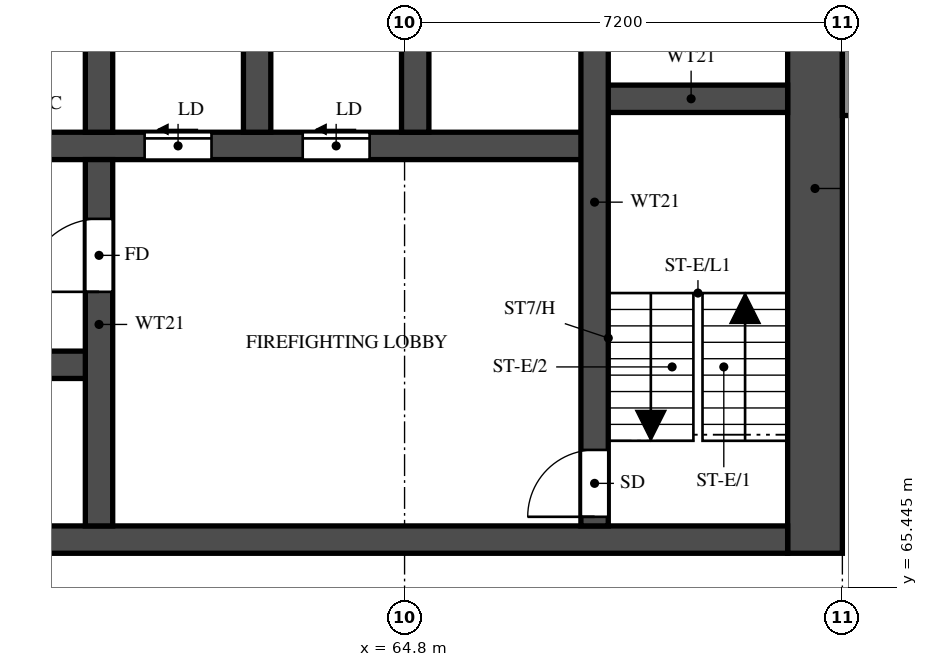
"""IFC4 building model, lengths in metres.
Left out: names, types, materials, properties, quantities, classifications, styles, units other than length and angle.
Written with IfcOpenShell. Run it as: python <this file> out.ifc"""

import sys

from ifc_helpers import new_model, si_unit, direction, frame, frame_2d, origin, place, context, subcontext, project, spatial, rectangle, extrude, element, fill, save


model = new_model("IFC4")
c1 = context("Model", 3, precision=1e-05, world=origin(), true_north=direction((0.0, 1.0)))
c2 = subcontext(c1, "Body", "Model", "MODEL_VIEW")
j1 = project(units=[si_unit("LENGTHUNIT", "METRE"), si_unit("PLANEANGLEUNIT", "RADIAN")], contexts=[c1])
p1 = place(None, origin())
s1 = spatial("IfcSite", under=j1, at=p1, CompositionType="ELEMENT")
p2 = place(p1, origin())
s2 = spatial("IfcBuilding", under=s1, at=p2, CompositionType="ELEMENT")
p3 = place(p2, frame((0.0, 0.0, 41.0)))
s3 = spatial("IfcBuildingStorey", under=s2, at=p3, CompositionType="ELEMENT", Elevation=41.0)
p4 = place(p3, frame((71.55, 66.0, 0.0), z_axis=(0.0, 0.0, 1.0), x_axis=(0.0, 1.0, 0.0)))
e1 = element("IfcWall", 1, at=p4, inside=s3, PredefinedType="SHEAR", context=c2, shape_type="SweptSolid", body=[
    extrude(rectangle(XDim=12.0, YDim=0.9, at=frame_2d((6.0, 0.0))), origin(), (0.0, 0.0, 1.0), 3.18),
])
p5 = place(p3, frame((29.7, 66.225, 0.0), z_axis=(0.0, 0.0, 1.0), x_axis=(1.0, 0.0, 0.0)))
e2 = element("IfcWall", 2, at=p5, inside=s3, PredefinedType="SHEAR", context=c2, shape_type="SweptSolid", body=[
    extrude(rectangle(XDim=41.4, YDim=0.45, at=frame_2d((20.7, 0.0))), origin(), (0.0, 0.0, 1.0), 3.18),
])
p6 = place(p5, frame((0.925, 0.0, 0.0)))
e3 = element("IfcOpeningElement", 3, at=p6, cuts=e2, PredefinedType="OPENING", context=c2, shape_type="SweptSolid", body=[
    extrude(rectangle(XDim=1.1, YDim=2.1, at=frame_2d((0.55, 1.05))), frame((0.0, 0.235, 0.0), z_axis=(0.0, -1.0, 0.0), x_axis=(1.0, 0.0, 0.0)), (0.0, 0.0, 1.0), 0.47),
])
p7 = place(p5, frame((3.738, 0.0, 0.0)))
e4 = element("IfcOpeningElement", 4, at=p7, cuts=e2, PredefinedType="OPENING", context=c2, shape_type="SweptSolid", body=[
    extrude(rectangle(XDim=1.8, YDim=2.1, at=frame_2d((0.9, 1.05))), frame((0.0, 0.235, 0.0), z_axis=(0.0, -1.0, 0.0), x_axis=(1.0, 0.0, 0.0)), (0.0, 0.0, 1.0), 0.47),
])
p8 = place(p3, frame((35.575, 69.1, 0.0), z_axis=(0.0, 0.0, 1.0), x_axis=(1.0, 0.0, 0.0)))
e5 = element("IfcWall", 5, at=p8, inside=s3, PredefinedType="SHEAR", context=c2, shape_type="SweptSolid", body=[
    extrude(rectangle(XDim=24.2, YDim=0.45, at=frame_2d((12.1, 0.0))), origin(), (0.0, 0.0, 1.0), 3.18),
])
p9 = place(p8, frame((1.05, 0.0, 0.0)))
e6 = element("IfcOpeningElement", 6, at=p9, cuts=e5, PredefinedType="OPENING", context=c2, shape_type="SweptSolid", body=[
    extrude(rectangle(XDim=1.1, YDim=2.1, at=frame_2d((0.55, 1.05))), frame((0.0, 0.235, 0.0), z_axis=(0.0, -1.0, 0.0), x_axis=(1.0, 0.0, 0.0)), (0.0, 0.0, 1.0), 0.47),
])
p10 = place(p8, frame((3.8, 0.0, 0.0)))
e7 = element("IfcOpeningElement", 7, at=p10, cuts=e5, PredefinedType="OPENING", context=c2, shape_type="SweptSolid", body=[
    extrude(rectangle(XDim=1.1, YDim=2.1, at=frame_2d((0.55, 1.05))), frame((0.0, 0.235, 0.0), z_axis=(0.0, -1.0, 0.0), x_axis=(1.0, 0.0, 0.0)), (0.0, 0.0, 1.0), 0.47),
])
p11 = place(p8, frame((6.55, 0.0, 0.0)))
e8 = element("IfcOpeningElement", 8, at=p11, cuts=e5, PredefinedType="OPENING", context=c2, shape_type="SweptSolid", body=[
    extrude(rectangle(XDim=1.1, YDim=2.1, at=frame_2d((0.55, 1.05))), frame((0.0, 0.235, 0.0), z_axis=(0.0, -1.0, 0.0), x_axis=(1.0, 0.0, 0.0)), (0.0, 0.0, 1.0), 0.47),
])
p12 = place(p8, frame((9.3, 0.0, 0.0)))
e9 = element("IfcOpeningElement", 9, at=p12, cuts=e5, PredefinedType="OPENING", context=c2, shape_type="SweptSolid", body=[
    extrude(rectangle(XDim=1.1, YDim=2.1, at=frame_2d((0.55, 1.05))), frame((0.0, 0.235, 0.0), z_axis=(0.0, -1.0, 0.0), x_axis=(1.0, 0.0, 0.0)), (0.0, 0.0, 1.0), 0.47),
])
p13 = place(p8, frame((12.05, 0.0, 0.0)))
e10 = element("IfcOpeningElement", 10, at=p13, cuts=e5, PredefinedType="OPENING", context=c2, shape_type="SweptSolid", body=[
    extrude(rectangle(XDim=1.1, YDim=2.1, at=frame_2d((0.55, 1.05))), frame((0.0, 0.235, 0.0), z_axis=(0.0, -1.0, 0.0), x_axis=(1.0, 0.0, 0.0)), (0.0, 0.0, 1.0), 0.47),
])
p14 = place(p8, frame((14.8, 0.0, 0.0)))
e11 = element("IfcOpeningElement", 11, at=p14, cuts=e5, PredefinedType="OPENING", context=c2, shape_type="SweptSolid", body=[
    extrude(rectangle(XDim=1.1, YDim=2.1, at=frame_2d((0.55, 1.05))), frame((0.0, 0.235, 0.0), z_axis=(0.0, -1.0, 0.0), x_axis=(1.0, 0.0, 0.0)), (0.0, 0.0, 1.0), 0.47),
])
p15 = place(p3, frame((32.875, 72.7, 0.0), z_axis=(0.0, 0.0, 1.0), x_axis=(1.0, 0.0, 0.0)))
e12 = element("IfcWall", 12, at=p15, inside=s3, PredefinedType="SHEAR", context=c2, shape_type="SweptSolid", body=[
    extrude(rectangle(XDim=35.05, YDim=0.45, at=frame_2d((17.525, 0.0))), origin(), (0.0, 0.0, 1.0), 3.18),
])
p16 = place(p15, frame((19.8, 0.0, 0.0)))
e13 = element("IfcOpeningElement", 13, at=p16, cuts=e12, PredefinedType="OPENING", context=c2, shape_type="SweptSolid", body=[
    extrude(rectangle(XDim=1.1, YDim=2.1, at=frame_2d((0.55, 1.05))), frame((0.0, 0.235, 0.0), z_axis=(0.0, -1.0, 0.0), x_axis=(1.0, 0.0, 0.0)), (0.0, 0.0, 1.0), 0.47),
])
p17 = place(p15, frame((27.65, 0.0, 0.0)))
e14 = element("IfcOpeningElement", 14, at=p17, cuts=e12, PredefinedType="OPENING", context=c2, shape_type="SweptSolid", body=[
    extrude(rectangle(XDim=1.1, YDim=2.1, at=frame_2d((0.55, 1.05))), frame((0.0, 0.235, 0.0), z_axis=(0.0, -1.0, 0.0), x_axis=(1.0, 0.0, 0.0)), (0.0, 0.0, 1.0), 0.47),
])
p18 = place(p15, frame((30.25, 0.0, 0.0)))
e15 = element("IfcOpeningElement", 15, at=p18, cuts=e12, PredefinedType="OPENING", context=c2, shape_type="SweptSolid", body=[
    extrude(rectangle(XDim=1.1, YDim=2.1, at=frame_2d((0.55, 1.05))), frame((0.0, 0.235, 0.0), z_axis=(0.0, -1.0, 0.0), x_axis=(1.0, 0.0, 0.0)), (0.0, 0.0, 1.0), 0.47),
])
p19 = place(p15, frame((3.75, 0.0, 0.0)))
e16 = element("IfcOpeningElement", 16, at=p19, cuts=e12, PredefinedType="OPENING", context=c2, shape_type="SweptSolid", body=[
    extrude(rectangle(XDim=1.1, YDim=2.1, at=frame_2d((0.55, 1.05))), frame((0.0, 0.235, 0.0), z_axis=(0.0, -1.0, 0.0), x_axis=(1.0, 0.0, 0.0)), (0.0, 0.0, 1.0), 0.47),
])
p20 = place(p15, frame((6.5, 0.0, 0.0)))
e17 = element("IfcOpeningElement", 17, at=p20, cuts=e12, PredefinedType="OPENING", context=c2, shape_type="SweptSolid", body=[
    extrude(rectangle(XDim=1.1, YDim=2.1, at=frame_2d((0.55, 1.05))), frame((0.0, 0.235, 0.0), z_axis=(0.0, -1.0, 0.0), x_axis=(1.0, 0.0, 0.0)), (0.0, 0.0, 1.0), 0.47),
])
p21 = place(p15, frame((9.25, 0.0, 0.0)))
e18 = element("IfcOpeningElement", 18, at=p21, cuts=e12, PredefinedType="OPENING", context=c2, shape_type="SweptSolid", body=[
    extrude(rectangle(XDim=1.1, YDim=2.1, at=frame_2d((0.55, 1.05))), frame((0.0, 0.235, 0.0), z_axis=(0.0, -1.0, 0.0), x_axis=(1.0, 0.0, 0.0)), (0.0, 0.0, 1.0), 0.47),
])
p22 = place(p15, frame((12.0, 0.0, 0.0)))
e19 = element("IfcOpeningElement", 19, at=p22, cuts=e12, PredefinedType="OPENING", context=c2, shape_type="SweptSolid", body=[
    extrude(rectangle(XDim=1.1, YDim=2.1, at=frame_2d((0.55, 1.05))), frame((0.0, 0.235, 0.0), z_axis=(0.0, -1.0, 0.0), x_axis=(1.0, 0.0, 0.0)), (0.0, 0.0, 1.0), 0.47),
])
p23 = place(p15, frame((14.75, 0.0, 0.0)))
e20 = element("IfcOpeningElement", 20, at=p23, cuts=e12, PredefinedType="OPENING", context=c2, shape_type="SweptSolid", body=[
    extrude(rectangle(XDim=1.1, YDim=2.1, at=frame_2d((0.55, 1.05))), frame((0.0, 0.235, 0.0), z_axis=(0.0, -1.0, 0.0), x_axis=(1.0, 0.0, 0.0)), (0.0, 0.0, 1.0), 0.47),
])
p24 = place(p15, frame((17.5, 0.0, 0.0)))
e21 = element("IfcOpeningElement", 21, at=p24, cuts=e12, PredefinedType="OPENING", context=c2, shape_type="SweptSolid", body=[
    extrude(rectangle(XDim=1.1, YDim=2.1, at=frame_2d((0.55, 1.05))), frame((0.0, 0.235, 0.0), z_axis=(0.0, -1.0, 0.0), x_axis=(1.0, 0.0, 0.0)), (0.0, 0.0, 1.0), 0.47),
])
p25 = place(p15, frame((0.913, 0.0, 0.0)))
e22 = element("IfcOpeningElement", 22, at=p25, cuts=e12, PredefinedType="OPENING", context=c2, shape_type="SweptSolid", body=[
    extrude(rectangle(XDim=1.1, YDim=2.1, at=frame_2d((0.55, 1.05))), frame((0.0, 0.235, 0.0), z_axis=(0.0, -1.0, 0.0), x_axis=(1.0, 0.0, 0.0)), (0.0, 0.0, 1.0), 0.47),
])
p26 = place(p3, frame((67.925, 73.475, 0.0), z_axis=(0.0, 0.0, 1.0), x_axis=(1.0, 0.0, 0.0)))
e23 = element("IfcWall", 23, at=p26, inside=s3, PredefinedType="SHEAR", context=c2, shape_type="SweptSolid", body=[
    extrude(rectangle(XDim=3.175, YDim=0.45, at=frame_2d((1.587, 0.0))), origin(), (0.0, 0.0, 1.0), 3.18),
])
p27 = place(p3, frame((67.925, 66.45, 0.0), z_axis=(0.0, 0.0, 1.0), x_axis=(0.0, 1.0, 0.0)))
e24 = element("IfcWall", 24, at=p27, inside=s3, PredefinedType="SHEAR", context=c2, shape_type="SweptSolid", body=[
    extrude(rectangle(XDim=10.65, YDim=0.45, at=frame_2d((5.325, 0.0))), origin(), (0.0, 0.0, 1.0), 3.18),
])
p28 = place(p27, frame((0.15, 0.0, 0.0)))
e25 = element("IfcOpeningElement", 25, at=p28, cuts=e24, PredefinedType="OPENING", context=c2, shape_type="SweptSolid", body=[
    extrude(rectangle(XDim=1.1, YDim=2.1, at=frame_2d((0.55, 1.05))), frame((0.0, 0.235, 0.0), z_axis=(0.0, -1.0, 0.0), x_axis=(1.0, 0.0, 0.0)), (0.0, 0.0, 1.0), 0.47),
])
p29 = place(p3, frame((59.775, 66.45, 0.0), z_axis=(0.0, 0.0, 1.0), x_axis=(0.0, 1.0, 0.0)))
e26 = element("IfcWall", 26, at=p29, inside=s3, PredefinedType="SHEAR", context=c2, shape_type="SweptSolid", body=[
    extrude(rectangle(XDim=6.025, YDim=0.45, at=frame_2d((3.013, 0.0))), origin(), (0.0, 0.0, 1.0), 3.18),
])
p30 = place(p29, frame((3.85, 0.0, 0.0)))
e27 = element("IfcOpeningElement", 27, at=p30, cuts=e26, PredefinedType="OPENING", context=c2, shape_type="SweptSolid", body=[
    extrude(rectangle(XDim=1.2, YDim=2.1, at=frame_2d((0.6, 1.05))), frame((0.0, 0.235, 0.0), z_axis=(0.0, -1.0, 0.0), x_axis=(1.0, 0.0, 0.0)), (0.0, 0.0, 1.0), 0.47),
])
for number, where, z_axis, x_axis in (
    (28, (59.775, 72.925, 0.0), (0.0, 0.0, 1.0), (0.0, 1.0, 0.0)),
    (29, (62.375, 72.925, 0.0), (0.0, 0.0, 1.0), (0.0, 1.0, 0.0)),
    (30, (64.975, 72.925, 0.0), (0.0, 0.0, 1.0), (0.0, 1.0, 0.0)),
):
    element("IfcWall", number, at=place(p3, frame(where, z_axis=z_axis, x_axis=x_axis)), inside=s3, PredefinedType="SHEAR", context=c2, shape_type="SweptSolid", body=[
        extrude(rectangle(XDim=2.95, YDim=0.45, at=frame_2d((1.475, 0.0))), origin(), (0.0, 0.0, 1.0), 3.18),
    ])
p31 = place(p3, frame((72.1, 73.2, 0.0), z_axis=(0.0, 0.0, 1.0), x_axis=(0.0, 1.0, 0.0)))
e31 = element("IfcWall", 31, at=p31, inside=s3, PredefinedType="SOLIDWALL", context=c2, shape_type="SweptSolid", body=[
    extrude(rectangle(XDim=4.8, YDim=0.2, at=frame_2d((2.4, 0.0))), origin(), (0.0, 0.0, 1.0), 3.18),
])
p32 = place(p28, origin())
e32 = element("IfcDoor", 32, at=p32, inside=s3, OperationType="SINGLE_SWING_LEFT", PredefinedType="DOOR", context=c2, shape_type="SweptSolid", body=[
    extrude(rectangle(XDim=1.1, YDim=2.1, at=frame_2d((0.55, 1.05))), frame((0.0, 0.025, 0.0), z_axis=(0.0, -1.0, 0.0), x_axis=(1.0, 0.0, 0.0)), (0.0, 0.0, 1.0), 0.05),
])
fill(e25, e32)
p33 = place(p30, origin())
e33 = element("IfcDoor", 33, at=p33, inside=s3, OperationType="SINGLE_SWING_RIGHT", PredefinedType="DOOR", context=c2, shape_type="SweptSolid", body=[
    extrude(rectangle(XDim=1.2, YDim=2.1, at=frame_2d((0.6, 1.05))), frame((0.0, 0.025, 0.0), z_axis=(0.0, -1.0, 0.0), x_axis=(1.0, 0.0, 0.0)), (0.0, 0.0, 1.0), 0.05),
])
fill(e27, e33)
p34 = place(p17, origin())
e34 = element("IfcDoor", 34, at=p34, inside=s3, OperationType="SLIDING_TO_LEFT", PredefinedType="DOOR", context=c2, shape_type="SweptSolid", body=[
    extrude(rectangle(XDim=1.1, YDim=2.1, at=frame_2d((0.55, 1.05))), frame((0.0, 0.025, 0.0), z_axis=(0.0, -1.0, 0.0), x_axis=(1.0, 0.0, 0.0)), (0.0, 0.0, 1.0), 0.05),
])
fill(e14, e34)
p35 = place(p18, origin())
e35 = element("IfcDoor", 35, at=p35, inside=s3, OperationType="SLIDING_TO_LEFT", PredefinedType="DOOR", context=c2, shape_type="SweptSolid", body=[
    extrude(rectangle(XDim=1.1, YDim=2.1, at=frame_2d((0.55, 1.05))), frame((0.0, 0.025, 0.0), z_axis=(0.0, -1.0, 0.0), x_axis=(1.0, 0.0, 0.0)), (0.0, 0.0, 1.0), 0.05),
])
fill(e15, e35)
save(model, sys.argv[1])
